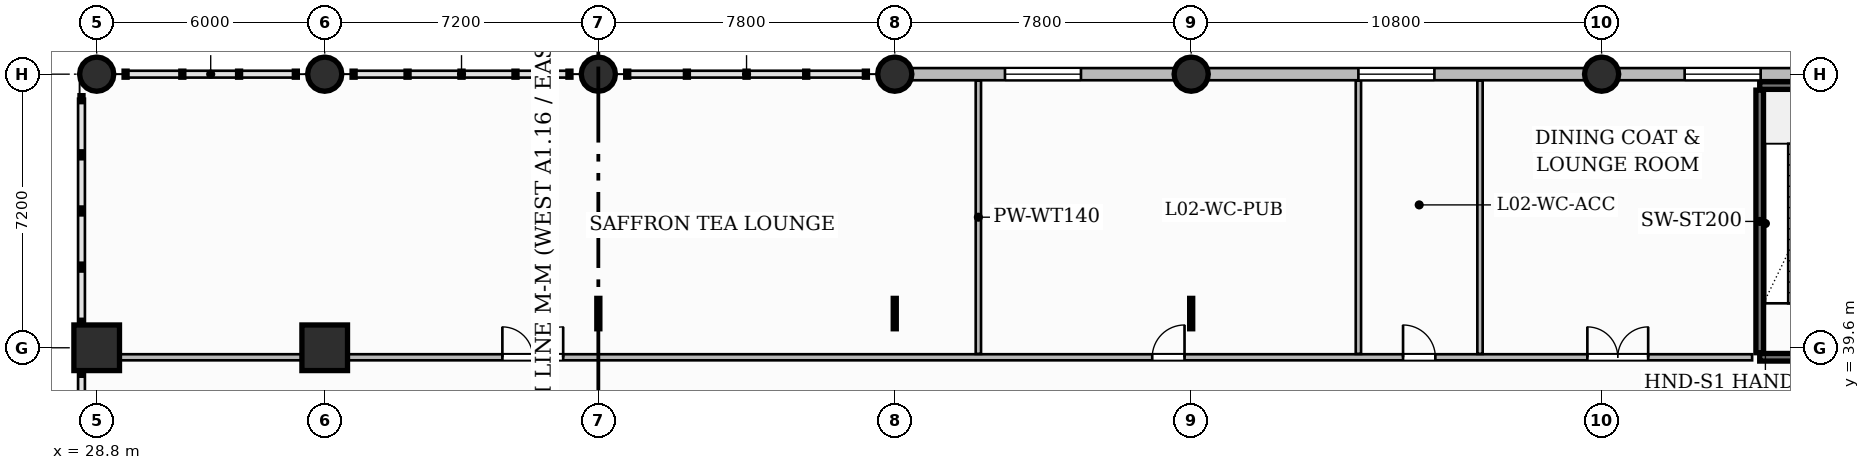
"""IFC4 building model, lengths in metres.
Left out: names, types, materials, properties, quantities, classifications, styles, units other than length and angle.
Written with IfcOpenShell. Run it as: python <this file> out.ifc"""

import sys

from ifc_helpers import new_model, si_unit, direction, frame, frame_2d, origin, origin_2d, place, context, subcontext, project, spatial, rectangle, circle, extrude, source, transform, mapped, element, fill, save


model = new_model("IFC4")
c1 = context("Model", 3, precision=1e-05, world=origin(), true_north=direction((0.0, 1.0)))
c2 = subcontext(c1, "Body", "Model", "MODEL_VIEW")
j1 = project(units=[si_unit("LENGTHUNIT", "METRE"), si_unit("PLANEANGLEUNIT", "RADIAN")], contexts=[c1])
p1 = place(None, origin())
s1 = spatial("IfcSite", under=j1, at=p1, CompositionType="ELEMENT")
p2 = place(p1, origin())
s2 = spatial("IfcBuilding", under=s1, at=p2, CompositionType="ELEMENT")
p3 = place(p2, frame((0.0, 0.0, 10.8)))
s3 = spatial("IfcBuildingStorey", under=s2, at=p3, CompositionType="ELEMENT", Elevation=10.8)
m1 = source(origin(), c2, "Body", "SweptSolid", [
    extrude(rectangle(XDim=1.2, YDim=1.2, at=origin_2d()), origin(), (0.0, 0.0, 1.0), 5.4),
])
p4 = place(p3, frame((28.8, 39.6, 0.0), z_axis=(0.0, 0.0, 1.0), x_axis=(1.0, 0.0, 0.0)))
e1 = element("IfcColumn", 1, at=p4, inside=s3, PredefinedType="COLUMN", context=c2, shape_type="MappedRepresentation", body=[
    mapped(m1, transform((0.0, 0.0, 0.0), scale=1.0)),
])
m2 = source(origin(), c2, "Body", "SweptSolid", [
    extrude(circle(Radius=0.45, at=origin_2d()), origin(), (0.0, 0.0, 1.0), 5.4),
])
p5 = place(p3, frame((28.8, 46.8, 0.0), z_axis=(0.0, 0.0, 1.0), x_axis=(1.0, 0.0, 0.0)))
e2 = element("IfcColumn", 2, at=p5, inside=s3, PredefinedType="COLUMN", context=c2, shape_type="MappedRepresentation", body=[
    mapped(m2, transform((0.0, 0.0, 0.0), scale=1.0)),
])
p6 = place(p3, frame((34.8, 39.6, 0.0), z_axis=(0.0, 0.0, 1.0), x_axis=(1.0, 0.0, 0.0)))
e3 = element("IfcColumn", 3, at=p6, inside=s3, PredefinedType="COLUMN", context=c2, shape_type="MappedRepresentation", body=[
    mapped(m1, transform((0.0, 0.0, 0.0), scale=1.0)),
])
for number, where, z_axis, x_axis in (
    (4, (34.8, 46.8, 0.0), (0.0, 0.0, 1.0), (1.0, 0.0, 0.0)),
    (5, (42.0, 46.8, 0.0), (0.0, 0.0, 1.0), (1.0, 0.0, 0.0)),
    (6, (49.8, 46.8, 0.0), (0.0, 0.0, 1.0), (1.0, 0.0, 0.0)),
    (7, (57.6, 46.8, 0.0), (0.0, 0.0, 1.0), (1.0, 0.0, 0.0)),
    (8, (68.4, 46.8, 0.0), (0.0, 0.0, 1.0), (1.0, 0.0, 0.0)),
):
    element("IfcColumn", number, at=place(p3, frame(where, z_axis=z_axis, x_axis=x_axis)), inside=s3, PredefinedType="COLUMN", context=c2, shape_type="MappedRepresentation", body=[
        mapped(m2, transform((0.0, 0.0, 0.0), scale=1.0)),
    ])
p7 = place(p3, frame((72.56, 39.47, 0.0), z_axis=(0.0, 0.0, 1.0), x_axis=(0.0, 1.0, 0.0)))
e9 = element("IfcWall", 9, at=p7, inside=s3, PredefinedType="SHEAR", context=c2, shape_type="SweptSolid", body=[
    extrude(rectangle(XDim=6.91, YDim=0.2, at=frame_2d((3.455, 0.0))), origin(), (0.0, 0.0, 1.0), 5.4),
])
p8 = place(p3, frame((72.56, 46.5, 0.0), z_axis=(0.0, 0.0, 1.0), x_axis=(1.0, 0.0, 0.0)))
e10 = element("IfcWall", 10, at=p8, inside=s3, PredefinedType="SHEAR", context=c2, shape_type="SweptSolid", body=[
    extrude(rectangle(XDim=2.94, YDim=0.2, at=frame_2d((1.47, 0.0))), origin(), (0.0, 0.0, 1.0), 5.4),
])
p9 = place(p3, frame((72.56, 39.35, 0.0), z_axis=(0.0, 0.0, 1.0), x_axis=(1.0, 0.0, 0.0)))
e11 = element("IfcWall", 11, at=p9, inside=s3, PredefinedType="SHEAR", context=c2, shape_type="SweptSolid", body=[
    extrude(rectangle(XDim=2.94, YDim=0.2, at=frame_2d((1.47, 0.0))), origin(), (0.0, 0.0, 1.0), 5.4),
])
p10 = place(p9, frame((0.985, 0.0, 0.0)))
e12 = element("IfcOpeningElement", 12, at=p10, cuts=e11, PredefinedType="OPENING", context=c2, shape_type="SweptSolid", body=[
    extrude(rectangle(XDim=1.05, YDim=2.2, at=frame_2d((0.525, 1.1))), frame((0.0, 0.11, 0.0), z_axis=(0.0, -1.0, 0.0), x_axis=(1.0, 0.0, 0.0)), (0.0, 0.0, 1.0), 0.22),
])
p11 = place(p3, frame((28.64, 39.35, 0.0), z_axis=(0.0, 0.0, 1.0), x_axis=(1.0, 0.0, 0.0)))
e13 = element("IfcWall", 13, at=p11, inside=s3, PredefinedType="PARTITIONING", context=c2, shape_type="SweptSolid", body=[
    extrude(rectangle(XDim=43.72, YDim=0.16, at=frame_2d((21.86, 0.0))), origin(), (0.0, 0.0, 1.0), 4.185),
])
p12 = place(p11, frame((10.835, 0.0, 0.0)))
e14 = element("IfcOpeningElement", 14, at=p12, cuts=e13, PredefinedType="OPENING", context=c2, shape_type="SweptSolid", body=[
    extrude(rectangle(XDim=1.6, YDim=2.4, at=frame_2d((0.8, 1.2))), frame((0.0, 0.09, 0.0), z_axis=(0.0, -1.0, 0.0), x_axis=(1.0, 0.0, 0.0)), (0.0, 0.0, 1.0), 0.18),
])
p13 = place(p11, frame((27.935, 0.0, 0.0)))
e15 = element("IfcOpeningElement", 15, at=p13, cuts=e13, PredefinedType="OPENING", context=c2, shape_type="SweptSolid", body=[
    extrude(rectangle(XDim=0.85, YDim=2.1, at=frame_2d((0.425, 1.05))), frame((0.0, 0.09, 0.0), z_axis=(0.0, -1.0, 0.0), x_axis=(1.0, 0.0, 0.0)), (0.0, 0.0, 1.0), 0.18),
])
p14 = place(p11, frame((34.535, 0.0, 0.0)))
e16 = element("IfcOpeningElement", 16, at=p14, cuts=e13, PredefinedType="OPENING", context=c2, shape_type="SweptSolid", body=[
    extrude(rectangle(XDim=0.85, YDim=2.1, at=frame_2d((0.425, 1.05))), frame((0.0, 0.09, 0.0), z_axis=(0.0, -1.0, 0.0), x_axis=(1.0, 0.0, 0.0)), (0.0, 0.0, 1.0), 0.18),
])
p15 = place(p11, frame((39.385, 0.0, 0.0)))
e17 = element("IfcOpeningElement", 17, at=p15, cuts=e13, PredefinedType="OPENING", context=c2, shape_type="SweptSolid", body=[
    extrude(rectangle(XDim=1.6, YDim=2.4, at=frame_2d((0.8, 1.2))), frame((0.0, 0.09, 0.0), z_axis=(0.0, -1.0, 0.0), x_axis=(1.0, 0.0, 0.0)), (0.0, 0.0, 1.0), 0.18),
])
for number, where, z_axis, x_axis in (
    (18, (52.0, 39.44, 0.0), (0.0, 0.0, 1.0), (0.0, 1.0, 0.0)),
    (19, (62.0, 39.44, 0.0), (0.0, 0.0, 1.0), (0.0, 1.0, 0.0)),
    (20, (65.2, 39.44, 0.0), (0.0, 0.0, 1.0), (0.0, 1.0, 0.0)),
):
    element("IfcWall", number, at=place(p3, frame(where, z_axis=z_axis, x_axis=x_axis)), inside=s3, PredefinedType="PARTITIONING", context=c2, shape_type="SweptSolid", body=[
        extrude(rectangle(XDim=7.192, YDim=0.14, at=frame_2d((3.596, 0.0))), origin(), (0.0, 0.0, 1.0), 5.1),
    ])
p16 = place(p3, frame((49.8, 46.8, 0.0), z_axis=(0.0, 0.0, 1.0), x_axis=(1.0, 0.0, 0.0)))
e21 = element("IfcWall", 21, at=p16, inside=s3, PredefinedType="SOLIDWALL", context=c2, shape_type="SweptSolid", body=[
    extrude(rectangle(XDim=30.6, YDim=0.32, at=frame_2d((15.3, 0.0))), origin(), (0.0, 0.0, 1.0), 4.185),
])
p17 = place(p16, frame((2.9, 0.0, 0.75)))
e22 = element("IfcOpeningElement", 22, at=p17, cuts=e21, PredefinedType="OPENING", context=c2, shape_type="SweptSolid", body=[
    extrude(rectangle(XDim=2.0, YDim=2.6, at=frame_2d((1.0, 1.3))), frame((0.0, 0.17, 0.0), z_axis=(0.0, -1.0, 0.0), x_axis=(1.0, 0.0, 0.0)), (0.0, 0.0, 1.0), 0.34),
])
p18 = place(p16, frame((12.2, 0.0, 0.75)))
e23 = element("IfcOpeningElement", 23, at=p18, cuts=e21, PredefinedType="OPENING", context=c2, shape_type="SweptSolid", body=[
    extrude(rectangle(XDim=2.0, YDim=2.6, at=frame_2d((1.0, 1.3))), frame((0.0, 0.17, 0.0), z_axis=(0.0, -1.0, 0.0), x_axis=(1.0, 0.0, 0.0)), (0.0, 0.0, 1.0), 0.34),
])
p19 = place(p16, frame((20.785, 0.0, 0.75)))
e24 = element("IfcOpeningElement", 24, at=p19, cuts=e21, PredefinedType="OPENING", context=c2, shape_type="SweptSolid", body=[
    extrude(rectangle(XDim=2.0, YDim=2.6, at=frame_2d((1.0, 1.3))), frame((0.0, 0.17, 0.0), z_axis=(0.0, -1.0, 0.0), x_axis=(1.0, 0.0, 0.0)), (0.0, 0.0, 1.0), 0.34),
])
p20 = place(p16, frame((25.445, 0.0, 0.75)))
e25 = element("IfcOpeningElement", 25, at=p20, cuts=e21, PredefinedType="OPENING", context=c2, shape_type="SweptSolid", body=[
    extrude(rectangle(XDim=2.0, YDim=2.6, at=frame_2d((1.0, 1.3))), frame((0.0, 0.17, 0.0), z_axis=(0.0, -1.0, 0.0), x_axis=(1.0, 0.0, 0.0)), (0.0, 0.0, 1.0), 0.34),
])
m3 = source(origin(), c2, "Body", "SweptSolid", [
    extrude(rectangle(XDim=1.6, YDim=2.4, at=frame_2d((0.8, 1.2))), frame((0.0, 0.025, 0.0), z_axis=(0.0, -1.0, 0.0), x_axis=(1.0, 0.0, 0.0)), (0.0, 0.0, 1.0), 0.05),
])
p21 = place(p12, origin())
e26 = element("IfcDoor", 26, at=p21, inside=s3, OperationType="DOUBLE_DOOR_SINGLE_SWING", PredefinedType="DOOR", context=c2, shape_type="MappedRepresentation", body=[
    mapped(m3, transform((0.0, 0.0, 0.0), scale=1.0)),
])
fill(e14, e26)
m4 = source(origin(), c2, "Body", "SweptSolid", [
    extrude(rectangle(XDim=0.85, YDim=2.1, at=frame_2d((0.425, 1.05))), frame((0.0, 0.025, 0.0), z_axis=(0.0, -1.0, 0.0), x_axis=(1.0, 0.0, 0.0)), (0.0, 0.0, 1.0), 0.05),
])
p22 = place(p13, origin())
e27 = element("IfcDoor", 27, at=p22, inside=s3, OperationType="SINGLE_SWING_RIGHT", PredefinedType="DOOR", context=c2, shape_type="MappedRepresentation", body=[
    mapped(m4, transform((0.0, 0.0, 0.0), scale=1.0)),
])
fill(e15, e27)
p23 = place(p14, origin())
e28 = element("IfcDoor", 28, at=p23, inside=s3, OperationType="SINGLE_SWING_LEFT", PredefinedType="DOOR", context=c2, shape_type="MappedRepresentation", body=[
    mapped(m4, transform((0.0, 0.0, 0.0), scale=1.0)),
])
fill(e16, e28)
p24 = place(p15, origin())
e29 = element("IfcDoor", 29, at=p24, inside=s3, OperationType="DOUBLE_DOOR_SINGLE_SWING", PredefinedType="DOOR", context=c2, shape_type="MappedRepresentation", body=[
    mapped(m3, transform((0.0, 0.0, 0.0), scale=1.0)),
])
fill(e17, e29)
m5 = source(origin(), c2, "Body", "SweptSolid", [
    extrude(rectangle(XDim=2.0, YDim=2.6, at=frame_2d((1.0, 1.3))), frame((0.0, 0.03, 0.0), z_axis=(0.0, -1.0, 0.0), x_axis=(1.0, 0.0, 0.0)), (0.0, 0.0, 1.0), 0.06),
])
p25 = place(p17, origin())
e30 = element("IfcWindow", 30, at=p25, inside=s3, PartitioningType="DOUBLE_PANEL_VERTICAL", PredefinedType="WINDOW", context=c2, shape_type="MappedRepresentation", body=[
    mapped(m5, transform((0.0, 0.0, 0.0), scale=1.0)),
])
fill(e22, e30)
p26 = place(p18, origin())
e31 = element("IfcWindow", 31, at=p26, inside=s3, PartitioningType="DOUBLE_PANEL_VERTICAL", PredefinedType="WINDOW", context=c2, shape_type="MappedRepresentation", body=[
    mapped(m5, transform((0.0, 0.0, 0.0), scale=1.0)),
])
fill(e23, e31)
p27 = place(p19, origin())
e32 = element("IfcWindow", 32, at=p27, inside=s3, PartitioningType="DOUBLE_PANEL_VERTICAL", PredefinedType="WINDOW", context=c2, shape_type="MappedRepresentation", body=[
    mapped(m5, transform((0.0, 0.0, 0.0), scale=1.0)),
])
fill(e24, e32)
save(model, sys.argv[1])
